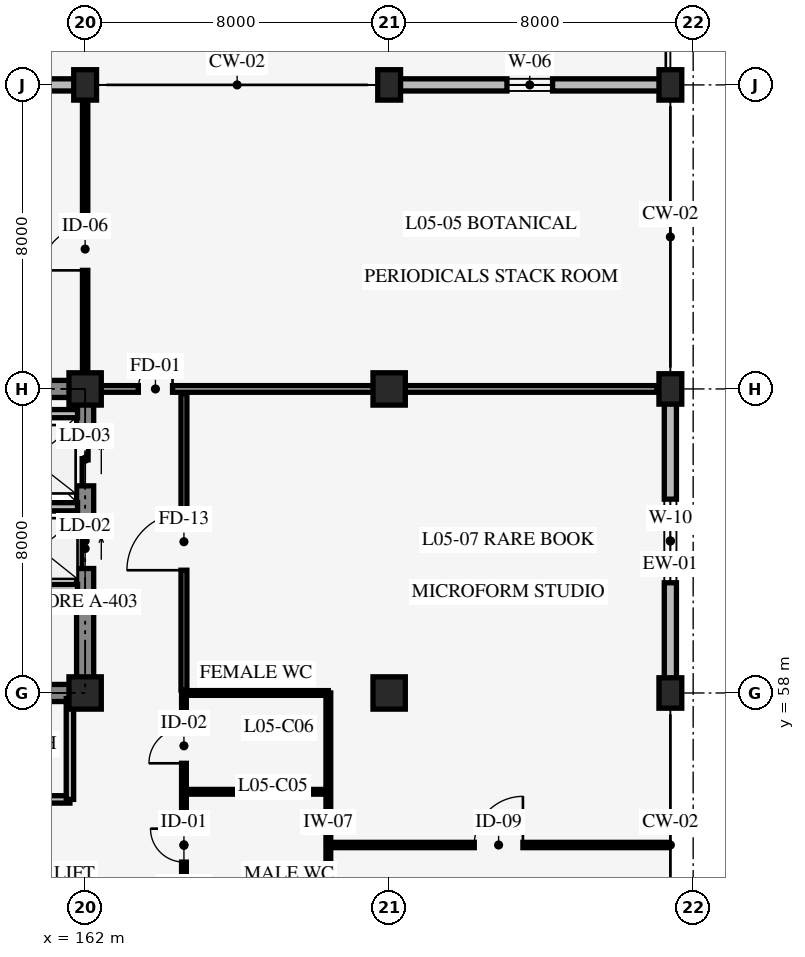
"""IFC4 building model, lengths in metres.
Left out: names, types, materials, properties, quantities, classifications, styles, units other than length and angle.
Written with IfcOpenShell. Run it as: python <this file> out.ifc"""

import sys

from ifc_helpers import new_model, si_unit, direction, frame, frame_2d, origin, origin_2d, place, context, subcontext, project, spatial, rectangle, extrude, element, fill, save


model = new_model("IFC4")
c1 = context("Model", 3, precision=1e-05, world=origin(), true_north=direction((0.0, 1.0)))
c2 = subcontext(c1, "Body", "Model", "MODEL_VIEW")
j1 = project(units=[si_unit("LENGTHUNIT", "METRE"), si_unit("PLANEANGLEUNIT", "RADIAN")], contexts=[c1])
p1 = place(None, origin())
s1 = spatial("IfcSite", under=j1, at=p1, CompositionType="ELEMENT")
p2 = place(p1, origin())
s2 = spatial("IfcBuilding", under=s1, at=p2, CompositionType="ELEMENT")
p3 = place(p2, frame((0.0, 0.0, 19.2)))
s3 = spatial("IfcBuildingStorey", under=s2, at=p3, CompositionType="ELEMENT", Elevation=19.2)
p4 = place(p3, frame((154.0, 58.0, 0.0), z_axis=(0.0, 0.0, 1.0), x_axis=(1.0, 0.0, 0.0)))
e1 = element("IfcWall", 1, at=p4, inside=s3, PredefinedType="SHEAR", context=c2, shape_type="SweptSolid", body=[
    extrude(rectangle(XDim=8.0, YDim=0.45, at=frame_2d((4.0, 0.0))), origin(), (0.0, 0.0, 1.0), 3.95),
])
p5 = place(p4, frame((1.4, 0.0, 0.0)))
e2 = element("IfcOpeningElement", 2, at=p5, cuts=e1, PredefinedType="OPENING", context=c2, shape_type="SweptSolid", body=[
    extrude(rectangle(XDim=1.3, YDim=2.15, at=frame_2d((0.65, 1.075))), frame((0.0, 0.235, 0.0), z_axis=(0.0, -1.0, 0.0), x_axis=(1.0, 0.0, 0.0)), (0.0, 0.0, 1.0), 0.47),
])
p6 = place(p4, frame((5.3, 0.0, 0.0)))
e3 = element("IfcOpeningElement", 3, at=p6, cuts=e1, PredefinedType="OPENING", context=c2, shape_type="SweptSolid", body=[
    extrude(rectangle(XDim=1.1, YDim=2.2, at=frame_2d((0.55, 1.1))), frame((0.0, 0.235, 0.0), z_axis=(0.0, -1.0, 0.0), x_axis=(1.0, 0.0, 0.0)), (0.0, 0.0, 1.0), 0.47),
])
p7 = place(p3, frame((162.0, 58.0, 0.0), z_axis=(0.0, 0.0, 1.0), x_axis=(0.0, 1.0, 0.0)))
e4 = element("IfcWall", 4, at=p7, inside=s3, PredefinedType="SHEAR", context=c2, shape_type="SweptSolid", body=[
    extrude(rectangle(XDim=8.0, YDim=0.45, at=frame_2d((4.0, 0.0))), origin(), (0.0, 0.0, 1.0), 3.95),
])
p8 = place(p7, frame((3.275, 0.0, 0.0)))
e5 = element("IfcOpeningElement", 5, at=p8, cuts=e4, PredefinedType="OPENING", context=c2, shape_type="SweptSolid", body=[
    extrude(rectangle(XDim=1.05, YDim=2.2, at=frame_2d((0.525, 1.1))), frame((0.0, 0.235, 0.0), z_axis=(0.0, -1.0, 0.0), x_axis=(1.0, 0.0, 0.0)), (0.0, 0.0, 1.0), 0.47),
])
p9 = place(p7, frame((5.45, 0.0, 0.0)))
e6 = element("IfcOpeningElement", 6, at=p9, cuts=e4, PredefinedType="OPENING", context=c2, shape_type="SweptSolid", body=[
    extrude(rectangle(XDim=1.4, YDim=2.3, at=frame_2d((0.7, 1.15))), frame((0.0, 0.235, 0.0), z_axis=(0.0, -1.0, 0.0), x_axis=(1.0, 0.0, 0.0)), (0.0, 0.0, 1.0), 0.47),
])
p10 = place(p3, frame((162.0, 66.0, 0.0), z_axis=(0.0, 0.0, 1.0), x_axis=(-1.0, 0.0, 0.0)))
e7 = element("IfcWall", 7, at=p10, inside=s3, PredefinedType="SHEAR", context=c2, shape_type="SweptSolid", body=[
    extrude(rectangle(XDim=8.0, YDim=0.45, at=frame_2d((4.0, 0.0))), origin(), (0.0, 0.0, 1.0), 3.95),
])
for number, where, z_axis, x_axis in (
    (8, (162.0, 58.0, 0.0), (0.0, 0.0, 1.0), (1.0, 0.0, 0.0)),
    (9, (162.0, 66.0, 0.0), (0.0, 0.0, 1.0), (1.0, 0.0, 0.0)),
):
    element("IfcColumn", number, at=place(p3, frame(where, z_axis=z_axis, x_axis=x_axis)), inside=s3, PredefinedType="COLUMN", context=c2, shape_type="SweptSolid", body=[
        extrude(rectangle(XDim=0.85, YDim=0.85, at=origin_2d()), origin(), (0.0, 0.0, 1.0), 4.2),
    ])
p11 = place(p3, frame((162.0, 74.0, 0.0), z_axis=(0.0, 0.0, 1.0), x_axis=(1.0, 0.0, 0.0)))
e10 = element("IfcColumn", 10, at=p11, inside=s3, PredefinedType="COLUMN", context=c2, shape_type="SweptSolid", body=[
    extrude(rectangle(XDim=0.6, YDim=0.8, at=origin_2d()), origin(), (0.0, 0.0, 1.0), 4.2),
])
for number, where, z_axis, x_axis in (
    (11, (170.0, 58.0, 0.0), (0.0, 0.0, 1.0), (1.0, 0.0, 0.0)),
    (12, (170.0, 66.0, 0.0), (0.0, 0.0, 1.0), (1.0, 0.0, 0.0)),
):
    element("IfcColumn", number, at=place(p3, frame(where, z_axis=z_axis, x_axis=x_axis)), inside=s3, PredefinedType="COLUMN", context=c2, shape_type="SweptSolid", body=[
        extrude(rectangle(XDim=0.85, YDim=0.85, at=origin_2d()), origin(), (0.0, 0.0, 1.0), 4.2),
    ])
for number, where, z_axis, x_axis in (
    (13, (170.0, 74.0, 0.0), (0.0, 0.0, 1.0), (1.0, 0.0, 0.0)),
    (14, (177.4, 58.0, 0.0), (0.0, 0.0, 1.0), (1.0, 0.0, 0.0)),
    (15, (177.4, 66.0, 0.0), (0.0, 0.0, 1.0), (1.0, 0.0, 0.0)),
    (16, (177.4, 74.0, 0.0), (0.0, 0.0, 1.0), (1.0, 0.0, 0.0)),
):
    element("IfcColumn", number, at=place(p3, frame(where, z_axis=z_axis, x_axis=x_axis)), inside=s3, PredefinedType="COLUMN", context=c2, shape_type="SweptSolid", body=[
        extrude(rectangle(XDim=0.6, YDim=0.8, at=origin_2d()), origin(), (0.0, 0.0, 1.0), 4.2),
    ])
p12 = place(p3, frame((154.0, 74.0, 0.0), z_axis=(0.0, 0.0, 1.0), x_axis=(1.0, 0.0, 0.0)))
e17 = element("IfcWall", 17, at=p12, inside=s3, PredefinedType="STANDARD", context=c2, shape_type="SweptSolid", body=[
    extrude(rectangle(XDim=8.0, YDim=0.32, at=frame_2d((4.0, 0.0))), origin(), (0.0, 0.0, 1.0), 3.14),
])
p13 = place(p12, frame((2.6, 0.0, 0.85)))
e18 = element("IfcOpeningElement", 18, at=p13, cuts=e17, PredefinedType="OPENING", context=c2, shape_type="SweptSolid", body=[
    extrude(rectangle(XDim=2.8, YDim=1.6, at=frame_2d((1.4, 0.8))), frame((0.0, 0.17, 0.0), z_axis=(0.0, -1.0, 0.0), x_axis=(1.0, 0.0, 0.0)), (0.0, 0.0, 1.0), 0.34),
])
p14 = place(p3, frame((170.0, 74.0, 0.0), z_axis=(0.0, 0.0, 1.0), x_axis=(1.0, 0.0, 0.0)))
e19 = element("IfcWall", 19, at=p14, inside=s3, PredefinedType="STANDARD", context=c2, shape_type="SweptSolid", body=[
    extrude(rectangle(XDim=7.4, YDim=0.32, at=frame_2d((3.7, 0.0))), origin(), (0.0, 0.0, 1.0), 3.14),
])
p15 = place(p14, frame((3.1, 0.0, 0.85)))
e20 = element("IfcOpeningElement", 20, at=p15, cuts=e19, PredefinedType="OPENING", context=c2, shape_type="SweptSolid", body=[
    extrude(rectangle(XDim=1.2, YDim=1.2, at=frame_2d((0.6, 0.6))), frame((0.0, 0.17, 0.0), z_axis=(0.0, -1.0, 0.0), x_axis=(1.0, 0.0, 0.0)), (0.0, 0.0, 1.0), 0.34),
])
p16 = place(p3, frame((177.4, 66.0, 0.0), z_axis=(0.0, 0.0, 1.0), x_axis=(0.0, -1.0, 0.0)))
e21 = element("IfcWall", 21, at=p16, inside=s3, PredefinedType="STANDARD", context=c2, shape_type="SweptSolid", body=[
    extrude(rectangle(XDim=8.0, YDim=0.32, at=frame_2d((4.0, 0.0))), origin(), (0.0, 0.0, 1.0), 3.19),
])
p17 = place(p16, frame((2.9, 0.0, 0.85)))
e22 = element("IfcOpeningElement", 22, at=p17, cuts=e21, PredefinedType="OPENING", context=c2, shape_type="SweptSolid", body=[
    extrude(rectangle(XDim=2.2, YDim=1.4, at=frame_2d((1.1, 0.7))), frame((0.0, 0.17, 0.0), z_axis=(0.0, -1.0, 0.0), x_axis=(1.0, 0.0, 0.0)), (0.0, 0.0, 1.0), 0.34),
])
p18 = place(p3, frame((158.45, 62.9, 0.0), z_axis=(0.0, 0.0, 1.0), x_axis=(1.0, 0.0, 0.0)))
e23 = element("IfcWall", 23, at=p18, inside=s3, PredefinedType="STANDARD", context=c2, shape_type="SweptSolid", body=[
    extrude(rectangle(XDim=3.35, YDim=0.215, at=frame_2d((1.675, 0.0))), origin(), (0.0, 0.0, 1.0), 3.9),
])
p19 = place(p3, frame((159.38, 65.35, 0.0), z_axis=(0.0, 0.0, 1.0), x_axis=(1.0, 0.0, 0.0)))
e24 = element("IfcWall", 24, at=p19, inside=s3, PredefinedType="STANDARD", context=c2, shape_type="SweptSolid", body=[
    extrude(rectangle(XDim=2.42, YDim=0.215, at=frame_2d((1.21, 0.0))), origin(), (0.0, 0.0, 1.0), 3.9),
])
p20 = place(p3, frame((158.45, 60.75, 0.0), z_axis=(0.0, 0.0, 1.0), x_axis=(1.0, 0.0, 0.0)))
e25 = element("IfcWall", 25, at=p20, inside=s3, PredefinedType="STANDARD", context=c2, shape_type="SweptSolid", body=[
    extrude(rectangle(XDim=3.35, YDim=0.215, at=frame_2d((1.675, 0.0))), origin(), (0.0, 0.0, 1.0), 3.9),
])
p21 = place(p3, frame((154.0, 55.2, 0.0), z_axis=(0.0, 0.0, 1.0), x_axis=(1.0, 0.0, 0.0)))
e26 = element("IfcWall", 26, at=p21, inside=s3, PredefinedType="STANDARD", context=c2, shape_type="SweptSolid", body=[
    extrude(rectangle(XDim=7.6, YDim=0.195, at=frame_2d((3.8, 0.0))), origin(), (0.0, 0.0, 1.0), 3.9),
])
p22 = place(p21, frame((2.8, 0.0, 0.0)))
e27 = element("IfcOpeningElement", 27, at=p22, cuts=e26, PredefinedType="OPENING", context=c2, shape_type="SweptSolid", body=[
    extrude(rectangle(XDim=1.25, YDim=2.15, at=frame_2d((0.625, 1.075))), frame((0.0, 0.107, 0.0), z_axis=(0.0, -1.0, 0.0), x_axis=(1.0, 0.0, 0.0)), (0.0, 0.0, 1.0), 0.215),
])
p23 = place(p3, frame((161.6, 55.2, 0.0), z_axis=(0.0, 0.0, 1.0), x_axis=(0.0, 1.0, 0.0)))
e28 = element("IfcWall", 28, at=p23, inside=s3, PredefinedType="STANDARD", context=c2, shape_type="SweptSolid", body=[
    extrude(rectangle(XDim=2.65, YDim=0.195, at=frame_2d((1.325, 0.0))), origin(), (0.0, 0.0, 1.0), 3.19),
])
p24 = place(p3, frame((164.6, 50.0, 0.0), z_axis=(0.0, 0.0, 1.0), x_axis=(0.0, 1.0, 0.0)))
e29 = element("IfcWall", 29, at=p24, inside=s3, PredefinedType="STANDARD", context=c2, shape_type="SweptSolid", body=[
    extrude(rectangle(XDim=8.0, YDim=0.125, at=frame_2d((4.0, 0.0))), origin(), (0.0, 0.0, 1.0), 3.9),
])
p25 = place(p24, frame((0.9, 0.0, 0.0)))
e30 = element("IfcOpeningElement", 30, at=p25, cuts=e29, PredefinedType="OPENING", context=c2, shape_type="SweptSolid", body=[
    extrude(rectangle(XDim=0.96, YDim=2.08, at=frame_2d((0.48, 1.04))), frame((0.0, 0.073, 0.0), z_axis=(0.0, -1.0, 0.0), x_axis=(1.0, 0.0, 0.0)), (0.0, 0.0, 1.0), 0.145),
])
p26 = place(p24, frame((3.55, 0.0, 0.0)))
e31 = element("IfcOpeningElement", 31, at=p26, cuts=e29, PredefinedType="OPENING", context=c2, shape_type="SweptSolid", body=[
    extrude(rectangle(XDim=0.88, YDim=2.05, at=frame_2d((0.44, 1.025))), frame((0.0, 0.073, 0.0), z_axis=(0.0, -1.0, 0.0), x_axis=(1.0, 0.0, 0.0)), (0.0, 0.0, 1.0), 0.145),
])
p27 = place(p24, frame((6.15, 0.0, 0.0)))
e32 = element("IfcOpeningElement", 32, at=p27, cuts=e29, PredefinedType="OPENING", context=c2, shape_type="SweptSolid", body=[
    extrude(rectangle(XDim=0.92, YDim=2.05, at=frame_2d((0.46, 1.025))), frame((0.0, 0.073, 0.0), z_axis=(0.0, -1.0, 0.0), x_axis=(1.0, 0.0, 0.0)), (0.0, 0.0, 1.0), 0.145),
])
p28 = place(p3, frame((168.4, 50.0, 0.0), z_axis=(0.0, 0.0, 1.0), x_axis=(0.0, 1.0, 0.0)))
e33 = element("IfcWall", 33, at=p28, inside=s3, PredefinedType="STANDARD", context=c2, shape_type="SweptSolid", body=[
    extrude(rectangle(XDim=8.0, YDim=0.125, at=frame_2d((4.0, 0.0))), origin(), (0.0, 0.0, 1.0), 3.9),
])
p29 = place(p3, frame((164.6, 55.4, 0.0), z_axis=(0.0, 0.0, 1.0), x_axis=(1.0, 0.0, 0.0)))
e34 = element("IfcWall", 34, at=p29, inside=s3, PredefinedType="STANDARD", context=c2, shape_type="SweptSolid", body=[
    extrude(rectangle(XDim=3.8, YDim=0.125, at=frame_2d((1.9, 0.0))), origin(), (0.0, 0.0, 1.0), 3.9),
])
p30 = place(p3, frame((164.6, 58.0, 0.0), z_axis=(0.0, 0.0, 1.0), x_axis=(1.0, 0.0, 0.0)))
e35 = element("IfcWall", 35, at=p30, inside=s3, PredefinedType="STANDARD", context=c2, shape_type="SweptSolid", body=[
    extrude(rectangle(XDim=3.8, YDim=0.125, at=frame_2d((1.9, 0.0))), origin(), (0.0, 0.0, 1.0), 3.14),
])
p31 = place(p3, frame((168.4, 54.0, 0.0), z_axis=(0.0, 0.0, 1.0), x_axis=(1.0, 0.0, 0.0)))
e36 = element("IfcWall", 36, at=p31, inside=s3, PredefinedType="STANDARD", context=c2, shape_type="SweptSolid", body=[
    extrude(rectangle(XDim=8.96, YDim=0.14, at=frame_2d((4.48, 0.0))), origin(), (0.0, 0.0, 1.0), 3.9),
])
p32 = place(p31, frame((3.84, 0.0, 0.0)))
e37 = element("IfcOpeningElement", 37, at=p32, cuts=e36, PredefinedType="OPENING", context=c2, shape_type="SweptSolid", body=[
    extrude(rectangle(XDim=1.28, YDim=2.14, at=frame_2d((0.64, 1.07))), frame((0.0, 0.08, 0.0), z_axis=(0.0, -1.0, 0.0), x_axis=(1.0, 0.0, 0.0)), (0.0, 0.0, 1.0), 0.16),
])
p33 = place(p3, frame((164.6, 58.08, 0.0), z_axis=(0.0, 0.0, 1.0), x_axis=(0.0, 1.0, 0.0)))
e38 = element("IfcWall", 38, at=p33, inside=s3, PredefinedType="STANDARD", context=c2, shape_type="SweptSolid", body=[
    extrude(rectangle(XDim=7.8, YDim=0.155, at=frame_2d((3.9, 0.0))), origin(), (0.0, 0.0, 1.0), 3.9),
])
p34 = place(p33, frame((3.15, 0.0, 0.0)))
e39 = element("IfcOpeningElement", 39, at=p34, cuts=e38, PredefinedType="OPENING", context=c2, shape_type="SweptSolid", body=[
    extrude(rectangle(XDim=1.5, YDim=2.2, at=frame_2d((0.75, 1.1))), frame((0.0, 0.087, 0.0), z_axis=(0.0, -1.0, 0.0), x_axis=(1.0, 0.0, 0.0)), (0.0, 0.0, 1.0), 0.175),
])
p35 = place(p3, frame((162.0, 66.12, 0.0), z_axis=(0.0, 0.0, 1.0), x_axis=(0.0, 1.0, 0.0)))
e40 = element("IfcWall", 40, at=p35, inside=s3, PredefinedType="STANDARD", context=c2, shape_type="SweptSolid", body=[
    extrude(rectangle(XDim=7.83, YDim=0.14, at=frame_2d((3.915, 0.0))), origin(), (0.0, 0.0, 1.0), 3.19),
])
p36 = place(p35, frame((3.0, 0.0, 0.0)))
e41 = element("IfcOpeningElement", 41, at=p36, cuts=e40, PredefinedType="OPENING", context=c2, shape_type="SweptSolid", body=[
    extrude(rectangle(XDim=1.12, YDim=2.12, at=frame_2d((0.56, 1.06))), frame((0.0, 0.08, 0.0), z_axis=(0.0, -1.0, 0.0), x_axis=(1.0, 0.0, 0.0)), (0.0, 0.0, 1.0), 0.16),
])
p37 = place(p3, frame((162.35, 66.0, 0.0), z_axis=(0.0, 0.0, 1.0), x_axis=(1.0, 0.0, 0.0)))
e42 = element("IfcWall", 42, at=p37, inside=s3, PredefinedType="STANDARD", context=c2, shape_type="SweptSolid", body=[
    extrude(rectangle(XDim=14.7, YDim=0.175, at=frame_2d((7.35, 0.0))), origin(), (0.0, 0.0, 1.0), 3.14),
])
p38 = place(p37, frame((1.05, 0.0, 0.0)))
e43 = element("IfcOpeningElement", 43, at=p38, cuts=e42, PredefinedType="OPENING", context=c2, shape_type="SweptSolid", body=[
    extrude(rectangle(XDim=0.9, YDim=2.1, at=frame_2d((0.45, 1.05))), frame((0.0, 0.098, 0.0), z_axis=(0.0, -1.0, 0.0), x_axis=(1.0, 0.0, 0.0)), (0.0, 0.0, 1.0), 0.195),
])
p39 = place(p15, origin())
e44 = element("IfcWindow", 44, at=p39, inside=s3, PartitioningType="SINGLE_PANEL", PredefinedType="WINDOW", context=c2, shape_type="SweptSolid", body=[
    extrude(rectangle(XDim=1.2, YDim=1.2, at=frame_2d((0.6, 0.6))), frame((0.0, 0.03, 0.0), z_axis=(0.0, -1.0, 0.0), x_axis=(1.0, 0.0, 0.0)), (0.0, 0.0, 1.0), 0.06),
])
fill(e20, e44)
p40 = place(p17, origin())
e45 = element("IfcWindow", 45, at=p40, inside=s3, PartitioningType="SINGLE_PANEL", PredefinedType="WINDOW", context=c2, shape_type="SweptSolid", body=[
    extrude(rectangle(XDim=2.2, YDim=1.4, at=frame_2d((1.1, 0.7))), frame((0.0, 0.03, 0.0), z_axis=(0.0, -1.0, 0.0), x_axis=(1.0, 0.0, 0.0)), (0.0, 0.0, 1.0), 0.06),
])
fill(e22, e45)
p41 = place(p8, origin())
e46 = element("IfcDoor", 46, at=p41, inside=s3, OperationType="SLIDING_TO_RIGHT", PredefinedType="DOOR", context=c2, shape_type="SweptSolid", body=[
    extrude(rectangle(XDim=1.05, YDim=2.2, at=frame_2d((0.525, 1.1))), frame((0.0, 0.025, 0.0), z_axis=(0.0, -1.0, 0.0), x_axis=(1.0, 0.0, 0.0)), (0.0, 0.0, 1.0), 0.05),
])
fill(e5, e46)
p42 = place(p9, origin())
e47 = element("IfcDoor", 47, at=p42, inside=s3, OperationType="DOUBLE_DOOR_SLIDING", PredefinedType="DOOR", context=c2, shape_type="SweptSolid", body=[
    extrude(rectangle(XDim=1.4, YDim=2.3, at=frame_2d((0.7, 1.15))), frame((0.0, 0.025, 0.0), z_axis=(0.0, -1.0, 0.0), x_axis=(1.0, 0.0, 0.0)), (0.0, 0.0, 1.0), 0.05),
])
fill(e6, e47)
p43 = place(p26, origin())
e48 = element("IfcDoor", 48, at=p43, inside=s3, OperationType="SINGLE_SWING_RIGHT", PredefinedType="DOOR", context=c2, shape_type="SweptSolid", body=[
    extrude(rectangle(XDim=0.88, YDim=2.05, at=frame_2d((0.44, 1.025))), frame((0.0, 0.025, 0.0), z_axis=(0.0, -1.0, 0.0), x_axis=(1.0, 0.0, 0.0)), (0.0, 0.0, 1.0), 0.05),
])
fill(e31, e48)
p44 = place(p27, origin())
e49 = element("IfcDoor", 49, at=p44, inside=s3, OperationType="SINGLE_SWING_LEFT", PredefinedType="DOOR", context=c2, shape_type="SweptSolid", body=[
    extrude(rectangle(XDim=0.92, YDim=2.05, at=frame_2d((0.46, 1.025))), frame((0.0, 0.025, 0.0), z_axis=(0.0, -1.0, 0.0), x_axis=(1.0, 0.0, 0.0)), (0.0, 0.0, 1.0), 0.05),
])
fill(e32, e49)
p45 = place(p32, origin())
e50 = element("IfcDoor", 50, at=p45, inside=s3, OperationType="SINGLE_SWING_RIGHT", PredefinedType="DOOR", context=c2, shape_type="SweptSolid", body=[
    extrude(rectangle(XDim=1.28, YDim=2.14, at=frame_2d((0.64, 1.07))), frame((0.0, 0.025, 0.0), z_axis=(0.0, -1.0, 0.0), x_axis=(1.0, 0.0, 0.0)), (0.0, 0.0, 1.0), 0.05),
])
fill(e37, e50)
p46 = place(p34, origin())
e51 = element("IfcDoor", 51, at=p46, inside=s3, OperationType="SINGLE_SWING_LEFT", PredefinedType="DOOR", context=c2, shape_type="SweptSolid", body=[
    extrude(rectangle(XDim=1.5, YDim=2.2, at=frame_2d((0.75, 1.1))), frame((0.0, 0.025, 0.0), z_axis=(0.0, -1.0, 0.0), x_axis=(1.0, 0.0, 0.0)), (0.0, 0.0, 1.0), 0.05),
])
fill(e39, e51)
p47 = place(p36, origin())
e52 = element("IfcDoor", 52, at=p47, inside=s3, OperationType="SINGLE_SWING_LEFT", PredefinedType="DOOR", context=c2, shape_type="SweptSolid", body=[
    extrude(rectangle(XDim=1.12, YDim=2.12, at=frame_2d((0.56, 1.06))), frame((0.0, 0.025, 0.0), z_axis=(0.0, -1.0, 0.0), x_axis=(1.0, 0.0, 0.0)), (0.0, 0.0, 1.0), 0.05),
])
fill(e41, e52)
p48 = place(p38, origin())
e53 = element("IfcDoor", 53, at=p48, inside=s3, OperationType="SINGLE_SWING_RIGHT", PredefinedType="DOOR", context=c2, shape_type="SweptSolid", body=[
    extrude(rectangle(XDim=0.9, YDim=2.1, at=frame_2d((0.45, 1.05))), frame((0.0, 0.025, 0.0), z_axis=(0.0, -1.0, 0.0), x_axis=(1.0, 0.0, 0.0)), (0.0, 0.0, 1.0), 0.05),
])
fill(e43, e53)
save(model, sys.argv[1])
